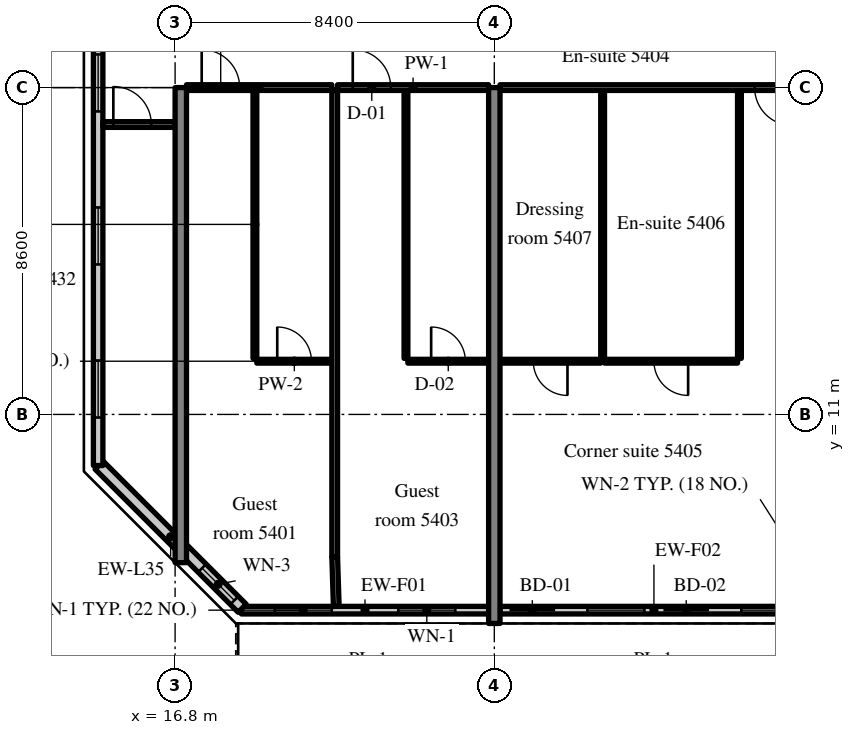
"""IFC4 building model, lengths in metres.
Left out: names, types, materials, properties, quantities, classifications, styles, units other than length and angle.
Written with IfcOpenShell. Run it as: python <this file> out.ifc"""

import sys

from ifc_helpers import new_model, si_unit, direction, frame, frame_2d, origin, place, context, subcontext, project, spatial, rectangle, extrude, source, transform, mapped, element, fill, save


model = new_model("IFC4")
c1 = context("Model", 3, precision=1e-05, world=origin(), true_north=direction((0.0, 1.0)))
c2 = subcontext(c1, "Body", "Model", "MODEL_VIEW")
j1 = project(units=[si_unit("LENGTHUNIT", "METRE"), si_unit("PLANEANGLEUNIT", "RADIAN")], contexts=[c1])
p1 = place(None, origin())
s1 = spatial("IfcSite", under=j1, at=p1, CompositionType="ELEMENT")
p2 = place(p1, origin())
s2 = spatial("IfcBuilding", under=s1, at=p2, CompositionType="ELEMENT")
p3 = place(p2, frame((0.0, 0.0, 225.7)))
s3 = spatial("IfcBuildingStorey", under=s2, at=p3, CompositionType="ELEMENT", Elevation=225.7)
m1 = source(origin(), c2, "Body", "SweptSolid", [
    extrude(rectangle(XDim=12.5, YDim=0.3, at=frame_2d((6.25, 0.0))), origin(), (0.0, 0.0, 1.0), 3.62),
])
p4 = place(p3, frame((16.95, 7.1, 0.0), z_axis=(0.0, 0.0, 1.0), x_axis=(0.0, 1.0, 0.0)))
e1 = element("IfcWall", 1, at=p4, inside=s3, PredefinedType="SHEAR", context=c2, shape_type="MappedRepresentation", body=[
    mapped(m1, transform((0.0, 0.0, 0.0), scale=1.0)),
])
m2 = source(origin(), c2, "Body", "SweptSolid", [
    extrude(rectangle(XDim=14.1, YDim=0.3, at=frame_2d((7.05, 0.0))), origin(), (0.0, 0.0, 1.0), 3.62),
])
p5 = place(p3, frame((25.2, 5.5, 0.0), z_axis=(0.0, 0.0, 1.0), x_axis=(0.0, 1.0, 0.0)))
e2 = element("IfcWall", 2, at=p5, inside=s3, PredefinedType="SHEAR", context=c2, shape_type="MappedRepresentation", body=[
    mapped(m2, transform((0.0, 0.0, 0.0), scale=1.0)),
])
m3 = source(origin(), c2, "Body", "SweptSolid", [
    extrude(rectangle(XDim=6.505, YDim=0.2, at=frame_2d((3.252, 0.0))), origin(), (0.0, 0.0, 1.0), 3.02),
])
p6 = place(p3, frame((18.545, 5.85, 0.0), z_axis=(0.0, 0.0, 1.0), x_axis=(1.0, 0.0, 0.0)))
e3 = element("IfcWall", 3, at=p6, inside=s3, PredefinedType="SOLIDWALL", context=c2, shape_type="MappedRepresentation", body=[
    mapped(m3, transform((0.0, 0.0, 0.0), scale=1.0)),
])
m4 = source(origin(), c2, "Body", "SweptSolid", [
    extrude(rectangle(XDim=1.5, YDim=1.5, at=frame_2d((0.75, 0.75))), frame((0.0, 0.11, 0.0), z_axis=(0.0, -1.0, 0.0), x_axis=(1.0, 0.0, 0.0)), (0.0, 0.0, 1.0), 0.22),
])
p7 = place(p6, frame((0.876, 0.0, 0.9)))
e4 = element("IfcOpeningElement", 4, at=p7, cuts=e3, PredefinedType="OPENING", context=c2, shape_type="MappedRepresentation", body=[
    mapped(m4, transform((0.0, 0.0, 0.0), scale=1.0)),
])
p8 = place(p6, frame((4.129, 0.0, 0.9)))
e5 = element("IfcOpeningElement", 5, at=p8, cuts=e3, PredefinedType="OPENING", context=c2, shape_type="MappedRepresentation", body=[
    mapped(m4, transform((0.0, 0.0, 0.0), scale=1.0)),
])
m5 = source(origin(), c2, "Body", "SweptSolid", [
    extrude(rectangle(XDim=8.1, YDim=0.2, at=frame_2d((4.05, 0.0))), origin(), (0.0, 0.0, 1.0), 3.02),
])
p9 = place(p3, frame((25.35, 5.85, 0.0), z_axis=(0.0, 0.0, 1.0), x_axis=(1.0, 0.0, 0.0)))
e6 = element("IfcWall", 6, at=p9, inside=s3, PredefinedType="SOLIDWALL", context=c2, shape_type="MappedRepresentation", body=[
    mapped(m5, transform((0.0, 0.0, 0.0), scale=1.0)),
])
m6 = source(origin(), c2, "Body", "SweptSolid", [
    extrude(rectangle(XDim=1.2, YDim=2.4, at=frame_2d((0.6, 1.2))), frame((0.0, 0.11, 0.0), z_axis=(0.0, -1.0, 0.0), x_axis=(1.0, 0.0, 0.0)), (0.0, 0.0, 1.0), 0.22),
])
p10 = place(p9, frame((0.25, 0.0, 0.0)))
e7 = element("IfcOpeningElement", 7, at=p10, cuts=e6, PredefinedType="OPENING", context=c2, shape_type="MappedRepresentation", body=[
    mapped(m6, transform((0.0, 0.0, 0.0), scale=1.0)),
])
p11 = place(p9, frame((2.3, 0.0, 0.9)))
e8 = element("IfcOpeningElement", 8, at=p11, cuts=e6, PredefinedType="OPENING", context=c2, shape_type="MappedRepresentation", body=[
    mapped(m4, transform((0.0, 0.0, 0.0), scale=1.0)),
])
p12 = place(p9, frame((4.3, 0.0, 0.0)))
e9 = element("IfcOpeningElement", 9, at=p12, cuts=e6, PredefinedType="OPENING", context=c2, shape_type="MappedRepresentation", body=[
    mapped(m6, transform((0.0, 0.0, 0.0), scale=1.0)),
])
p13 = place(p9, frame((6.35, 0.0, 0.9)))
e10 = element("IfcOpeningElement", 10, at=p13, cuts=e6, PredefinedType="OPENING", context=c2, shape_type="MappedRepresentation", body=[
    mapped(m4, transform((0.0, 0.0, 0.0), scale=1.0)),
])
m7 = source(origin(), c2, "Body", "SweptSolid", [
    extrude(rectangle(XDim=5.326, YDim=0.3, at=frame_2d((2.663, 0.0))), origin(), (0.0, 0.0, 1.0), 3.62),
])
p14 = place(p3, frame((14.8, 9.666, 0.0), z_axis=(0.0, 0.0, 1.0), x_axis=(0.707083859269, -0.707129702361, 0.0)))
e11 = element("IfcWall", 11, at=p14, inside=s3, PredefinedType="SOLIDWALL", context=c2, shape_type="MappedRepresentation", body=[
    mapped(m7, transform((0.0, 0.0, 0.0), scale=1.0)),
])
m8 = source(origin(), c2, "Body", "SweptSolid", [
    extrude(rectangle(XDim=1.2, YDim=1.5, at=frame_2d((0.6, 0.75))), frame((0.0, 0.16, 0.0), z_axis=(0.0, -1.0, 0.0), x_axis=(1.0, 0.0, 0.0)), (0.0, 0.0, 1.0), 0.32),
])
p15 = place(p14, frame((3.833, 0.0, 0.9)))
e12 = element("IfcOpeningElement", 12, at=p15, cuts=e11, PredefinedType="OPENING", context=c2, shape_type="MappedRepresentation", body=[
    mapped(m8, transform((0.0, 0.0, 0.0), scale=1.0)),
])
m9 = source(origin(), c2, "Body", "SweptSolid", [
    extrude(rectangle(XDim=28.189, YDim=0.25, at=frame_2d((14.095, 0.0))), origin(), (0.0, 0.0, 1.0), 3.62),
])
p16 = place(p3, frame((14.775, 37.845, 0.0), z_axis=(0.0, 0.0, 1.0), x_axis=(0.0, -1.0, 0.0)))
e13 = element("IfcWall", 13, at=p16, inside=s3, PredefinedType="SOLIDWALL", context=c2, shape_type="MappedRepresentation", body=[
    mapped(m9, transform((0.0, 0.0, 0.0), scale=1.0)),
])
m10 = source(origin(), c2, "Body", "SweptSolid", [
    extrude(rectangle(XDim=1.5, YDim=1.5, at=frame_2d((0.75, 0.75))), frame((0.0, 0.135, 0.0), z_axis=(0.0, -1.0, 0.0), x_axis=(1.0, 0.0, 0.0)), (0.0, 0.0, 1.0), 0.27),
])
p17 = place(p16, frame((1.263, 0.0, 0.9)))
e14 = element("IfcOpeningElement", 14, at=p17, cuts=e13, PredefinedType="OPENING", context=c2, shape_type="MappedRepresentation", body=[
    mapped(m10, transform((0.0, 0.0, 0.0), scale=1.0)),
])
p18 = place(p16, frame((5.291, 0.0, 0.9)))
e15 = element("IfcOpeningElement", 15, at=p18, cuts=e13, PredefinedType="OPENING", context=c2, shape_type="MappedRepresentation", body=[
    mapped(m10, transform((0.0, 0.0, 0.0), scale=1.0)),
])
p19 = place(p16, frame((9.318, 0.0, 0.9)))
e16 = element("IfcOpeningElement", 16, at=p19, cuts=e13, PredefinedType="OPENING", context=c2, shape_type="MappedRepresentation", body=[
    mapped(m10, transform((0.0, 0.0, 0.0), scale=1.0)),
])
p20 = place(p16, frame((13.345, 0.0, 0.9)))
e17 = element("IfcOpeningElement", 17, at=p20, cuts=e13, PredefinedType="OPENING", context=c2, shape_type="MappedRepresentation", body=[
    mapped(m10, transform((0.0, 0.0, 0.0), scale=1.0)),
])
p21 = place(p16, frame((17.372, 0.0, 0.9)))
e18 = element("IfcOpeningElement", 18, at=p21, cuts=e13, PredefinedType="OPENING", context=c2, shape_type="MappedRepresentation", body=[
    mapped(m10, transform((0.0, 0.0, 0.0), scale=1.0)),
])
p22 = place(p16, frame((21.399, 0.0, 0.9)))
e19 = element("IfcOpeningElement", 19, at=p22, cuts=e13, PredefinedType="OPENING", context=c2, shape_type="MappedRepresentation", body=[
    mapped(m10, transform((0.0, 0.0, 0.0), scale=1.0)),
])
p23 = place(p16, frame((25.426, 0.0, 0.9)))
e20 = element("IfcOpeningElement", 20, at=p23, cuts=e13, PredefinedType="OPENING", context=c2, shape_type="MappedRepresentation", body=[
    mapped(m10, transform((0.0, 0.0, 0.0), scale=1.0)),
])
m11 = source(origin(), c2, "Body", "SweptSolid", [
    extrude(rectangle(XDim=7.05, YDim=0.1, at=frame_2d((3.525, 0.0))), origin(), (0.0, 0.0, 1.0), 3.62),
])
p24 = place(p3, frame((18.9, 12.475, 0.0), z_axis=(0.0, 0.0, 1.0), x_axis=(0.0, 1.0, 0.0)))
e21 = element("IfcWall", 21, at=p24, inside=s3, PredefinedType="PARTITIONING", context=c2, shape_type="MappedRepresentation", body=[
    mapped(m11, transform((0.0, 0.0, 0.0), scale=1.0)),
])
m12 = source(origin(), c2, "Body", "SweptSolid", [
    extrude(rectangle(XDim=1.975, YDim=0.1, at=frame_2d((0.988, 0.0))), origin(), (0.0, 0.0, 1.0), 3.62),
])
p25 = place(p3, frame((18.95, 12.4, 0.0), z_axis=(0.0, 0.0, 1.0), x_axis=(1.0, 0.0, 0.0)))
e22 = element("IfcWall", 22, at=p25, inside=s3, PredefinedType="PARTITIONING", context=c2, shape_type="MappedRepresentation", body=[
    mapped(m12, transform((0.0, 0.0, 0.0), scale=1.0)),
])
m13 = source(origin(), c2, "Body", "SweptSolid", [
    extrude(rectangle(XDim=0.9, YDim=2.1, at=frame_2d((0.45, 1.05))), frame((0.0, 0.06, 0.0), z_axis=(0.0, -1.0, 0.0), x_axis=(1.0, 0.0, 0.0)), (0.0, 0.0, 1.0), 0.12),
])
p26 = place(p25, frame((0.538, 0.0, 0.0)))
e23 = element("IfcOpeningElement", 23, at=p26, cuts=e22, PredefinedType="OPENING", context=c2, shape_type="MappedRepresentation", body=[
    mapped(m13, transform((0.0, 0.0, 0.0), scale=1.0)),
])
m14 = source(origin(), c2, "Body", "SweptSolid", [
    extrude(rectangle(XDim=3.825, YDim=0.15, at=frame_2d((1.913, 0.0))), origin(), (0.0, 0.0, 1.0), 2.92),
])
p27 = place(p3, frame((17.1, 19.6, 0.0), z_axis=(0.0, 0.0, 1.0), x_axis=(1.0, 0.0, 0.0)))
e24 = element("IfcWall", 24, at=p27, inside=s3, PredefinedType="PARTITIONING", context=c2, shape_type="MappedRepresentation", body=[
    mapped(m14, transform((0.0, 0.0, 0.0), scale=1.0)),
])
m15 = source(origin(), c2, "Body", "SweptSolid", [
    extrude(rectangle(XDim=1.0, YDim=2.1, at=frame_2d((0.5, 1.05))), frame((0.0, 0.085, 0.0), z_axis=(0.0, -1.0, 0.0), x_axis=(1.0, 0.0, 0.0)), (0.0, 0.0, 1.0), 0.17),
])
p28 = place(p27, frame((0.4, 0.0, 0.0)))
e25 = element("IfcOpeningElement", 25, at=p28, cuts=e24, PredefinedType="OPENING", context=c2, shape_type="MappedRepresentation", body=[
    mapped(m15, transform((0.0, 0.0, 0.0), scale=1.0)),
])
p29 = place(p3, frame((22.875, 12.475, 0.0), z_axis=(0.0, 0.0, 1.0), x_axis=(0.0, 1.0, 0.0)))
e26 = element("IfcWall", 26, at=p29, inside=s3, PredefinedType="PARTITIONING", context=c2, shape_type="MappedRepresentation", body=[
    mapped(m11, transform((0.0, 0.0, 0.0), scale=1.0)),
])
m16 = source(origin(), c2, "Body", "SweptSolid", [
    extrude(rectangle(XDim=2.125, YDim=0.1, at=frame_2d((1.062, 0.0))), origin(), (0.0, 0.0, 1.0), 3.62),
])
p30 = place(p3, frame((22.925, 12.4, 0.0), z_axis=(0.0, 0.0, 1.0), x_axis=(1.0, 0.0, 0.0)))
e27 = element("IfcWall", 27, at=p30, inside=s3, PredefinedType="PARTITIONING", context=c2, shape_type="MappedRepresentation", body=[
    mapped(m16, transform((0.0, 0.0, 0.0), scale=1.0)),
])
p31 = place(p30, frame((0.613, 0.0, 0.0)))
e28 = element("IfcOpeningElement", 28, at=p31, cuts=e27, PredefinedType="OPENING", context=c2, shape_type="MappedRepresentation", body=[
    mapped(m13, transform((0.0, 0.0, 0.0), scale=1.0)),
])
m17 = source(origin(), c2, "Body", "SweptSolid", [
    extrude(rectangle(XDim=3.975, YDim=0.15, at=frame_2d((1.988, 0.0))), origin(), (0.0, 0.0, 1.0), 2.92),
])
p32 = place(p3, frame((21.075, 19.6, 0.0), z_axis=(0.0, 0.0, 1.0), x_axis=(1.0, 0.0, 0.0)))
e29 = element("IfcWall", 29, at=p32, inside=s3, PredefinedType="PARTITIONING", context=c2, shape_type="MappedRepresentation", body=[
    mapped(m17, transform((0.0, 0.0, 0.0), scale=1.0)),
])
p33 = place(p32, frame((0.4, 0.0, 0.0)))
e30 = element("IfcOpeningElement", 30, at=p33, cuts=e29, PredefinedType="OPENING", context=c2, shape_type="MappedRepresentation", body=[
    mapped(m15, transform((0.0, 0.0, 0.0), scale=1.0)),
])
m18 = source(origin(), c2, "Body", "SweptSolid", [
    extrude(rectangle(XDim=12.275, YDim=0.15, at=frame_2d((6.137, 0.0))), origin(), (0.0, 0.0, 1.0), 3.62),
])
p34 = place(p3, frame((21.0, 7.25, 0.0), z_axis=(0.0, 0.0, 1.0), x_axis=(0.0, 1.0, 0.0)))
e31 = element("IfcWall", 31, at=p34, inside=s3, PredefinedType="PARTITIONING", context=c2, shape_type="MappedRepresentation", body=[
    mapped(m18, transform((0.0, 0.0, 0.0), scale=1.0)),
])
for number, where, z_axis, x_axis in (
    (32, (31.65, 12.475, 0.0), (0.0, 0.0, 1.0), (0.0, 1.0, 0.0)),
    (33, (28.05, 12.475, 0.0), (0.0, 0.0, 1.0), (0.0, 1.0, 0.0)),
):
    element("IfcWall", number, at=place(p3, frame(where, z_axis=z_axis, x_axis=x_axis)), inside=s3, PredefinedType="PARTITIONING", context=c2, shape_type="MappedRepresentation", body=[
        mapped(m11, transform((0.0, 0.0, 0.0), scale=1.0)),
    ])
m19 = source(origin(), c2, "Body", "SweptSolid", [
    extrude(rectangle(XDim=3.5, YDim=0.1, at=frame_2d((1.75, 0.0))), origin(), (0.0, 0.0, 1.0), 3.62),
])
p35 = place(p3, frame((28.1, 12.4, 0.0), z_axis=(0.0, 0.0, 1.0), x_axis=(1.0, 0.0, 0.0)))
e34 = element("IfcWall", 34, at=p35, inside=s3, PredefinedType="PARTITIONING", context=c2, shape_type="MappedRepresentation", body=[
    mapped(m19, transform((0.0, 0.0, 0.0), scale=1.0)),
])
p36 = place(p35, frame((1.3, 0.0, 0.0)))
e35 = element("IfcOpeningElement", 35, at=p36, cuts=e34, PredefinedType="OPENING", context=c2, shape_type="MappedRepresentation", body=[
    mapped(m13, transform((0.0, 0.0, 0.0), scale=1.0)),
])
m20 = source(origin(), c2, "Body", "SweptSolid", [
    extrude(rectangle(XDim=2.65, YDim=0.1, at=frame_2d((1.325, 0.0))), origin(), (0.0, 0.0, 1.0), 3.62),
])
p37 = place(p3, frame((25.35, 12.4, 0.0), z_axis=(0.0, 0.0, 1.0), x_axis=(1.0, 0.0, 0.0)))
e36 = element("IfcWall", 36, at=p37, inside=s3, PredefinedType="PARTITIONING", context=c2, shape_type="MappedRepresentation", body=[
    mapped(m20, transform((0.0, 0.0, 0.0), scale=1.0)),
])
p38 = place(p37, frame((0.875, 0.0, 0.0)))
e37 = element("IfcOpeningElement", 37, at=p38, cuts=e36, PredefinedType="OPENING", context=c2, shape_type="MappedRepresentation", body=[
    mapped(m13, transform((0.0, 0.0, 0.0), scale=1.0)),
])
m21 = source(origin(), c2, "Body", "SweptSolid", [
    extrude(rectangle(XDim=8.1, YDim=0.15, at=frame_2d((4.05, 0.0))), origin(), (0.0, 0.0, 1.0), 2.92),
])
p39 = place(p3, frame((25.35, 19.6, 0.0), z_axis=(0.0, 0.0, 1.0), x_axis=(1.0, 0.0, 0.0)))
e38 = element("IfcWall", 38, at=p39, inside=s3, PredefinedType="PARTITIONING", context=c2, shape_type="MappedRepresentation", body=[
    mapped(m21, transform((0.0, 0.0, 0.0), scale=1.0)),
])
p40 = place(p39, frame((6.7, 0.0, 0.0)))
e39 = element("IfcOpeningElement", 39, at=p40, cuts=e38, PredefinedType="OPENING", context=c2, shape_type="MappedRepresentation", body=[
    mapped(m15, transform((0.0, 0.0, 0.0), scale=1.0)),
])
m22 = source(origin(), c2, "Body", "SweptSolid", [
    extrude(rectangle(XDim=1.9, YDim=0.15, at=frame_2d((0.95, 0.0))), origin(), (0.0, 0.0, 1.0), 2.92),
])
p41 = place(p3, frame((14.9, 18.628, 0.0), z_axis=(0.0, 0.0, 1.0), x_axis=(1.0, 0.0, 0.0)))
e40 = element("IfcWall", 40, at=p41, inside=s3, PredefinedType="PARTITIONING", context=c2, shape_type="MappedRepresentation", body=[
    mapped(m22, transform((0.0, 0.0, 0.0), scale=1.0)),
])
p42 = place(p41, frame((0.275, 0.0, 0.0)))
e41 = element("IfcOpeningElement", 41, at=p42, cuts=e40, PredefinedType="OPENING", context=c2, shape_type="MappedRepresentation", body=[
    mapped(m15, transform((0.0, 0.0, 0.0), scale=1.0)),
])
m23 = source(origin(), c2, "Body", "SweptSolid", [
    extrude(rectangle(XDim=1.301, YDim=0.15, at=frame_2d((0.65, 0.0))), origin(), (0.0, 0.0, 1.0), 3.62),
])
p43 = place(p3, frame((21.041, 5.95, 0.0), z_axis=(0.0, 0.0, 1.0), x_axis=(-0.031533606063, 0.999502692187, 0.0)))
e42 = element("IfcWall", 42, at=p43, inside=s3, PredefinedType="PARTITIONING", context=c2, shape_type="MappedRepresentation", body=[
    mapped(m23, transform((0.0, 0.0, 0.0), scale=1.0)),
])
m24 = source(origin(), c2, "Body", "SweptSolid", [
    extrude(rectangle(XDim=1.5, YDim=1.5, at=frame_2d((0.75, 0.75))), frame((0.0, 0.03, 0.0), z_axis=(0.0, -1.0, 0.0), x_axis=(1.0, 0.0, 0.0)), (0.0, 0.0, 1.0), 0.06),
])
p44 = place(p7, origin())
e43 = element("IfcWindow", 43, at=p44, inside=s3, PartitioningType="SINGLE_PANEL", PredefinedType="WINDOW", context=c2, shape_type="MappedRepresentation", body=[
    mapped(m24, transform((0.0, 0.0, 0.0), scale=1.0)),
])
fill(e4, e43)
p45 = place(p8, origin())
e44 = element("IfcWindow", 44, at=p45, inside=s3, PartitioningType="SINGLE_PANEL", PredefinedType="WINDOW", context=c2, shape_type="MappedRepresentation", body=[
    mapped(m24, transform((0.0, 0.0, 0.0), scale=1.0)),
])
fill(e5, e44)
m25 = source(origin(), c2, "Body", "SweptSolid", [
    extrude(rectangle(XDim=1.2, YDim=2.4, at=frame_2d((0.6, 1.2))), frame((0.0, 0.025, 0.0), z_axis=(0.0, -1.0, 0.0), x_axis=(1.0, 0.0, 0.0)), (0.0, 0.0, 1.0), 0.05),
])
p46 = place(p10, origin())
e45 = element("IfcDoor", 45, at=p46, inside=s3, OperationType="SLIDING_TO_LEFT", PredefinedType="DOOR", context=c2, shape_type="MappedRepresentation", body=[
    mapped(m25, transform((0.0, 0.0, 0.0), scale=1.0)),
])
fill(e7, e45)
p47 = place(p11, origin())
e46 = element("IfcWindow", 46, at=p47, inside=s3, PartitioningType="SINGLE_PANEL", PredefinedType="WINDOW", context=c2, shape_type="MappedRepresentation", body=[
    mapped(m24, transform((0.0, 0.0, 0.0), scale=1.0)),
])
fill(e8, e46)
p48 = place(p12, origin())
e47 = element("IfcDoor", 47, at=p48, inside=s3, OperationType="SLIDING_TO_RIGHT", PredefinedType="DOOR", context=c2, shape_type="MappedRepresentation", body=[
    mapped(m25, transform((0.0, 0.0, 0.0), scale=1.0)),
])
fill(e9, e47)
p49 = place(p13, origin())
e48 = element("IfcWindow", 48, at=p49, inside=s3, PartitioningType="SINGLE_PANEL", PredefinedType="WINDOW", context=c2, shape_type="MappedRepresentation", body=[
    mapped(m24, transform((0.0, 0.0, 0.0), scale=1.0)),
])
fill(e10, e48)
m26 = source(origin(), c2, "Body", "SweptSolid", [
    extrude(rectangle(XDim=1.2, YDim=1.5, at=frame_2d((0.6, 0.75))), frame((0.0, 0.03, 0.0), z_axis=(0.0, -1.0, 0.0), x_axis=(1.0, 0.0, 0.0)), (0.0, 0.0, 1.0), 0.06),
])
p50 = place(p15, origin())
e49 = element("IfcWindow", 49, at=p50, inside=s3, PartitioningType="SINGLE_PANEL", PredefinedType="WINDOW", context=c2, shape_type="MappedRepresentation", body=[
    mapped(m26, transform((0.0, 0.0, 0.0), scale=1.0)),
])
fill(e12, e49)
p51 = place(p21, origin())
e50 = element("IfcWindow", 50, at=p51, inside=s3, PartitioningType="SINGLE_PANEL", PredefinedType="WINDOW", context=c2, shape_type="MappedRepresentation", body=[
    mapped(m24, transform((0.0, 0.0, 0.0), scale=1.0)),
])
fill(e18, e50)
p52 = place(p22, origin())
e51 = element("IfcWindow", 51, at=p52, inside=s3, PartitioningType="SINGLE_PANEL", PredefinedType="WINDOW", context=c2, shape_type="MappedRepresentation", body=[
    mapped(m24, transform((0.0, 0.0, 0.0), scale=1.0)),
])
fill(e19, e51)
p53 = place(p23, origin())
e52 = element("IfcWindow", 52, at=p53, inside=s3, PartitioningType="SINGLE_PANEL", PredefinedType="WINDOW", context=c2, shape_type="MappedRepresentation", body=[
    mapped(m24, transform((0.0, 0.0, 0.0), scale=1.0)),
])
fill(e20, e52)
m27 = source(origin(), c2, "Body", "SweptSolid", [
    extrude(rectangle(XDim=0.9, YDim=2.1, at=frame_2d((0.45, 1.05))), frame((0.0, 0.025, 0.0), z_axis=(0.0, -1.0, 0.0), x_axis=(1.0, 0.0, 0.0)), (0.0, 0.0, 1.0), 0.05),
])
p54 = place(p26, origin())
e53 = element("IfcDoor", 53, at=p54, inside=s3, OperationType="SINGLE_SWING_LEFT", PredefinedType="DOOR", context=c2, shape_type="MappedRepresentation", body=[
    mapped(m27, transform((0.0, 0.0, 0.0), scale=1.0)),
])
fill(e23, e53)
m28 = source(origin(), c2, "Body", "SweptSolid", [
    extrude(rectangle(XDim=1.0, YDim=2.1, at=frame_2d((0.5, 1.05))), frame((0.0, 0.025, 0.0), z_axis=(0.0, -1.0, 0.0), x_axis=(1.0, 0.0, 0.0)), (0.0, 0.0, 1.0), 0.05),
])
p55 = place(p28, origin())
e54 = element("IfcDoor", 54, at=p55, inside=s3, OperationType="SINGLE_SWING_LEFT", PredefinedType="DOOR", context=c2, shape_type="MappedRepresentation", body=[
    mapped(m28, transform((0.0, 0.0, 0.0), scale=1.0)),
])
fill(e25, e54)
p56 = place(p31, origin())
e55 = element("IfcDoor", 55, at=p56, inside=s3, OperationType="SINGLE_SWING_LEFT", PredefinedType="DOOR", context=c2, shape_type="MappedRepresentation", body=[
    mapped(m27, transform((0.0, 0.0, 0.0), scale=1.0)),
])
fill(e28, e55)
p57 = place(p33, origin())
e56 = element("IfcDoor", 56, at=p57, inside=s3, OperationType="SINGLE_SWING_LEFT", PredefinedType="DOOR", context=c2, shape_type="MappedRepresentation", body=[
    mapped(m28, transform((0.0, 0.0, 0.0), scale=1.0)),
])
fill(e30, e56)
p58 = place(p36, origin())
e57 = element("IfcDoor", 57, at=p58, inside=s3, OperationType="SINGLE_SWING_RIGHT", PredefinedType="DOOR", context=c2, shape_type="MappedRepresentation", body=[
    mapped(m27, transform((0.0, 0.0, 0.0), scale=1.0)),
])
fill(e35, e57)
p59 = place(p38, origin())
e58 = element("IfcDoor", 58, at=p59, inside=s3, OperationType="SINGLE_SWING_RIGHT", PredefinedType="DOOR", context=c2, shape_type="MappedRepresentation", body=[
    mapped(m27, transform((0.0, 0.0, 0.0), scale=1.0)),
])
fill(e37, e58)
p60 = place(p40, origin())
e59 = element("IfcDoor", 59, at=p60, inside=s3, OperationType="SINGLE_SWING_RIGHT", PredefinedType="DOOR", context=c2, shape_type="MappedRepresentation", body=[
    mapped(m28, transform((0.0, 0.0, 0.0), scale=1.0)),
])
fill(e39, e59)
p61 = place(p42, origin())
e60 = element("IfcDoor", 60, at=p61, inside=s3, OperationType="SINGLE_SWING_LEFT", PredefinedType="DOOR", context=c2, shape_type="MappedRepresentation", body=[
    mapped(m28, transform((0.0, 0.0, 0.0), scale=1.0)),
])
fill(e41, e60)
save(model, sys.argv[1])
